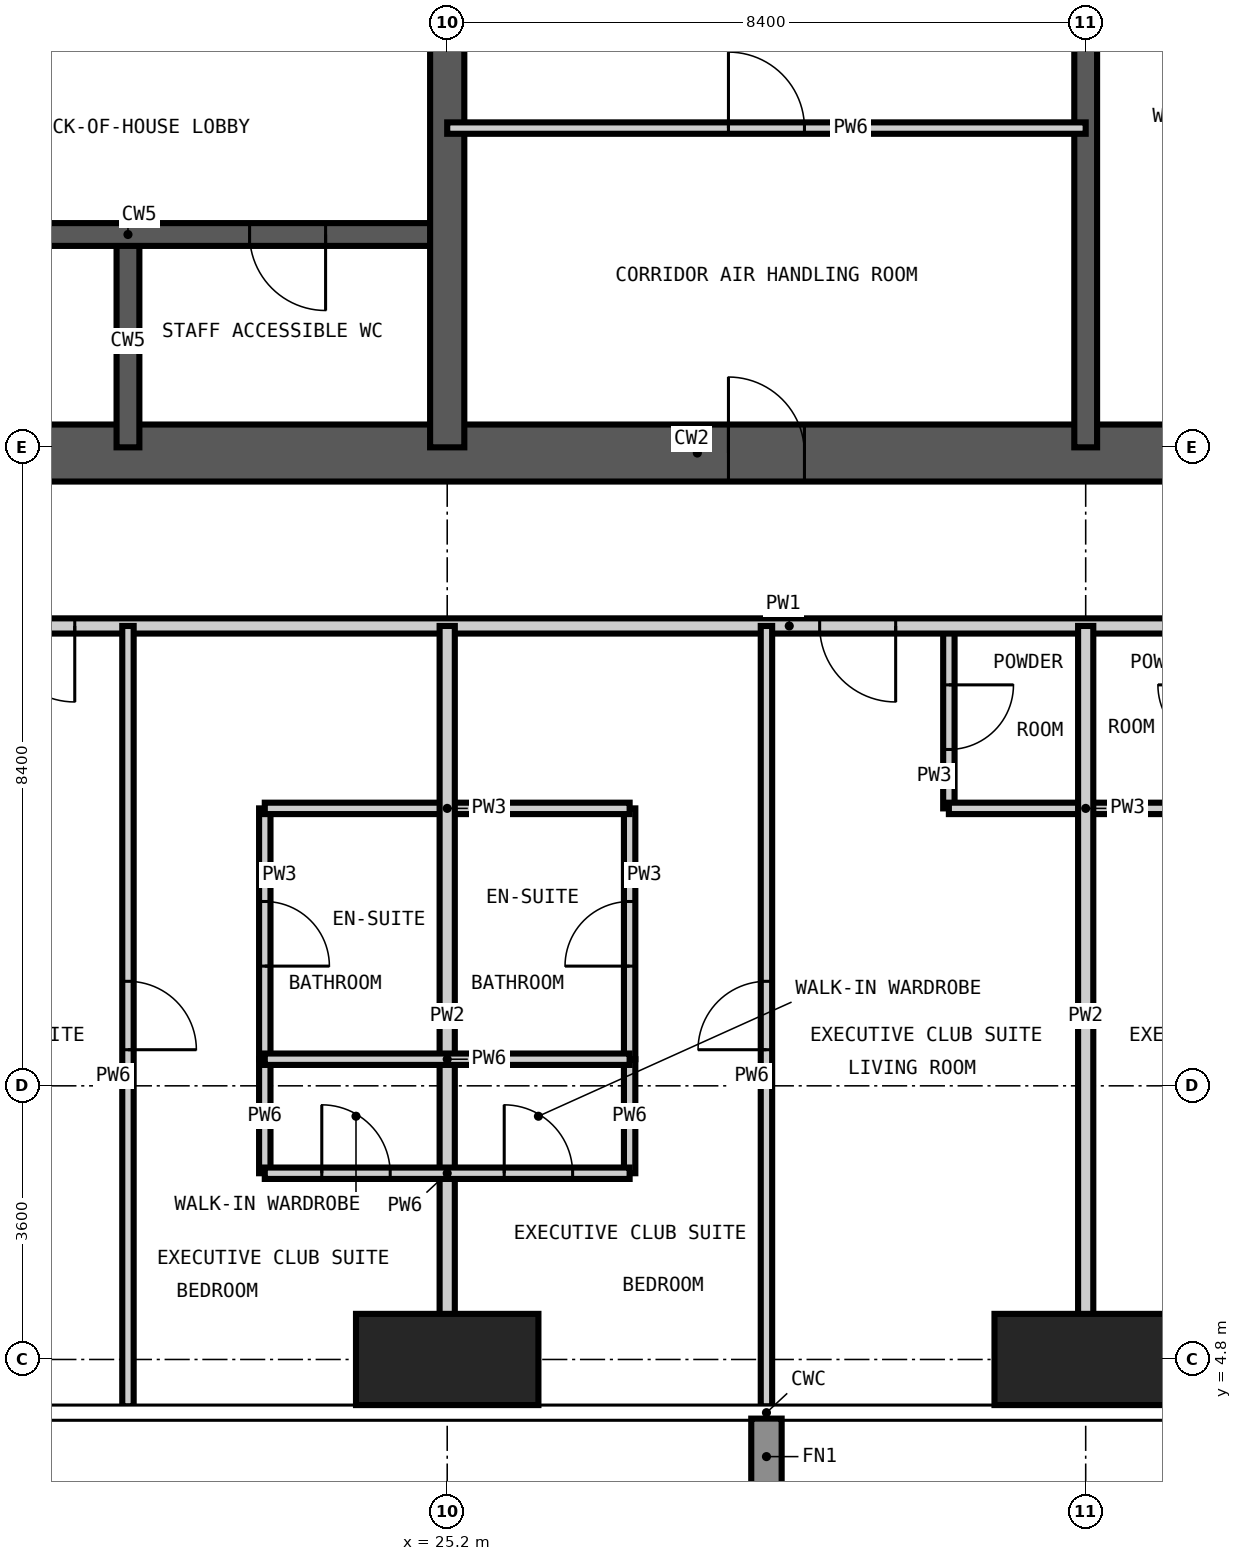
"""IFC4 building model, lengths in metres.
Left out: names, types, materials, properties, quantities, classifications, styles, units other than length and angle.
Written with IfcOpenShell. Run it as: python <this file> out.ifc"""

import sys

from ifc_helpers import new_model, si_unit, direction, frame, frame_2d, origin, origin_2d, place, context, subcontext, project, spatial, rectangle, extrude, element, fill, save


model = new_model("IFC4")
c1 = context("Model", 3, precision=1e-05, world=origin(), true_north=direction((0.0, 1.0)))
c2 = subcontext(c1, "Body", "Model", "MODEL_VIEW")
j1 = project(units=[si_unit("LENGTHUNIT", "METRE"), si_unit("PLANEANGLEUNIT", "RADIAN")], contexts=[c1])
p1 = place(None, origin())
s1 = spatial("IfcSite", under=j1, at=p1, CompositionType="ELEMENT")
p2 = place(p1, origin())
s2 = spatial("IfcBuilding", under=s1, at=p2, CompositionType="ELEMENT")
p3 = place(p2, frame((0.0, 0.0, 177.0)))
s3 = spatial("IfcBuildingStorey", under=s2, at=p3, CompositionType="ELEMENT", Elevation=177.0)
for number, where, z_axis, x_axis in (
    (1, (25.2, 4.8, -0.35), (0.0, 0.0, 1.0), (1.0, 0.0, 0.0)),
    (2, (33.6, 4.8, -0.35), (0.0, 0.0, 1.0), (1.0, 0.0, 0.0)),
):
    element("IfcColumn", number, at=place(p3, frame(where, z_axis=z_axis, x_axis=x_axis)), inside=s3, PredefinedType="COLUMN", context=c2, shape_type="SweptSolid", body=[
        extrude(rectangle(XDim=2.4, YDim=1.2, at=origin_2d()), origin(), (0.0, 0.0, 1.0), 3.6),
    ])
p4 = place(p3, frame((16.35, 16.725, -0.35), z_axis=(0.0, 0.0, 1.0), x_axis=(1.0, 0.0, 0.0)))
e3 = element("IfcWall", 3, at=p4, inside=s3, PredefinedType="SHEAR", context=c2, shape_type="SweptSolid", body=[
    extrude(rectangle(XDim=26.1, YDim=0.75, at=frame_2d((13.05, 0.0))), origin(), (0.0, 0.0, 1.0), 3.6),
])
p5 = place(p4, frame((12.55, 0.0, 0.35)))
e4 = element("IfcOpeningElement", 4, at=p5, cuts=e3, PredefinedType="OPENING", context=c2, shape_type="SweptSolid", body=[
    extrude(rectangle(XDim=1.0, YDim=2.1, at=frame_2d((0.5, 1.05))), frame((0.0, 0.385, 0.0), z_axis=(0.0, -1.0, 0.0), x_axis=(1.0, 0.0, 0.0)), (0.0, 0.0, 1.0), 0.77),
])
p6 = place(p4, frame((18.85, 0.0, 0.35)))
e5 = element("IfcOpeningElement", 5, at=p6, cuts=e3, PredefinedType="OPENING", context=c2, shape_type="SweptSolid", body=[
    extrude(rectangle(XDim=1.0, YDim=2.1, at=frame_2d((0.5, 1.05))), frame((0.0, 0.385, 0.0), z_axis=(0.0, -1.0, 0.0), x_axis=(1.0, 0.0, 0.0)), (0.0, 0.0, 1.0), 0.77),
])
p7 = place(p3, frame((21.0, 16.8, -0.35), z_axis=(0.0, 0.0, 1.0), x_axis=(0.0, 1.0, 0.0)))
e6 = element("IfcWall", 6, at=p7, inside=s3, PredefinedType="SHEAR", context=c2, shape_type="SweptSolid", body=[
    extrude(rectangle(XDim=2.8, YDim=0.3, at=frame_2d((1.4, 0.0))), origin(), (0.0, 0.0, 1.0), 3.6),
])
p8 = place(p3, frame((33.6, 16.8, -0.35), z_axis=(0.0, 0.0, 1.0), x_axis=(0.0, 1.0, 0.0)))
e7 = element("IfcWall", 7, at=p8, inside=s3, PredefinedType="SHEAR", context=c2, shape_type="SweptSolid", body=[
    extrude(rectangle(XDim=25.2, YDim=0.3, at=frame_2d((12.6, 0.0))), origin(), (0.0, 0.0, 1.0), 3.6),
])
p9 = place(p8, frame((22.5, 0.0, 0.35)))
e8 = element("IfcOpeningElement", 8, at=p9, cuts=e7, PredefinedType="OPENING", context=c2, shape_type="SweptSolid", body=[
    extrude(rectangle(XDim=1.2, YDim=2.2, at=frame_2d((0.6, 1.1))), frame((0.0, 0.16, 0.0), z_axis=(0.0, -1.0, 0.0), x_axis=(1.0, 0.0, 0.0)), (0.0, 0.0, 1.0), 0.32),
])
p10 = place(p8, frame((18.3, 0.0, 0.35)))
e9 = element("IfcOpeningElement", 9, at=p10, cuts=e7, PredefinedType="OPENING", context=c2, shape_type="SweptSolid", body=[
    extrude(rectangle(XDim=1.2, YDim=2.2, at=frame_2d((0.6, 1.1))), frame((0.0, 0.16, 0.0), z_axis=(0.0, -1.0, 0.0), x_axis=(1.0, 0.0, 0.0)), (0.0, 0.0, 1.0), 0.32),
])
p11 = place(p8, frame((12.1, 0.0, 0.35)))
e10 = element("IfcOpeningElement", 10, at=p11, cuts=e7, PredefinedType="OPENING", context=c2, shape_type="SweptSolid", body=[
    extrude(rectangle(XDim=1.0, YDim=2.1, at=frame_2d((0.5, 1.05))), frame((0.0, 0.16, 0.0), z_axis=(0.0, -1.0, 0.0), x_axis=(1.0, 0.0, 0.0)), (0.0, 0.0, 1.0), 0.32),
])
p12 = place(p3, frame((16.8, 19.6, -0.35), z_axis=(0.0, 0.0, 1.0), x_axis=(1.0, 0.0, 0.0)))
e11 = element("IfcWall", 11, at=p12, inside=s3, PredefinedType="SHEAR", context=c2, shape_type="SweptSolid", body=[
    extrude(rectangle(XDim=8.4, YDim=0.3, at=frame_2d((4.2, 0.0))), origin(), (0.0, 0.0, 1.0), 3.6),
])
p13 = place(p12, frame((1.6, 0.0, 0.35)))
e12 = element("IfcOpeningElement", 12, at=p13, cuts=e11, PredefinedType="OPENING", context=c2, shape_type="SweptSolid", body=[
    extrude(rectangle(XDim=1.0, YDim=2.1, at=frame_2d((0.5, 1.05))), frame((0.0, 0.16, 0.0), z_axis=(0.0, -1.0, 0.0), x_axis=(1.0, 0.0, 0.0)), (0.0, 0.0, 1.0), 0.32),
])
p14 = place(p12, frame((5.8, 0.0, 0.35)))
e13 = element("IfcOpeningElement", 13, at=p14, cuts=e11, PredefinedType="OPENING", context=c2, shape_type="SweptSolid", body=[
    extrude(rectangle(XDim=1.0, YDim=2.1, at=frame_2d((0.5, 1.05))), frame((0.0, 0.16, 0.0), z_axis=(0.0, -1.0, 0.0), x_axis=(1.0, 0.0, 0.0)), (0.0, 0.0, 1.0), 0.32),
])
p15 = place(p3, frame((25.2, 16.8, -0.35), z_axis=(0.0, 0.0, 1.0), x_axis=(0.0, 1.0, 0.0)))
e14 = element("IfcWall", 14, at=p15, inside=s3, PredefinedType="SHEAR", context=c2, shape_type="SweptSolid", body=[
    extrude(rectangle(XDim=25.2, YDim=0.45, at=frame_2d((12.6, 0.0))), origin(), (0.0, 0.0, 1.0), 3.6),
])
p16 = place(p3, frame((22.8, 8.75, 0.0), z_axis=(0.0, 0.0, 1.0), x_axis=(0.0, 1.0, 0.0)))
e15 = element("IfcWall", 15, at=p16, inside=s3, PredefinedType="PARTITIONING", context=c2, shape_type="SweptSolid", body=[
    extrude(rectangle(XDim=3.3, YDim=0.15, at=frame_2d((1.65, 0.0))), origin(), (0.0, 0.0, 1.0), 3.25),
])
p17 = place(p16, frame((1.225, 0.0, 0.0)))
e16 = element("IfcOpeningElement", 16, at=p17, cuts=e15, PredefinedType="OPENING", context=c2, shape_type="SweptSolid", body=[
    extrude(rectangle(XDim=0.85, YDim=2.1, at=frame_2d((0.425, 1.05))), frame((0.0, 0.085, 0.0), z_axis=(0.0, -1.0, 0.0), x_axis=(1.0, 0.0, 0.0)), (0.0, 0.0, 1.0), 0.17),
])
p18 = place(p3, frame((27.6, 8.75, 0.0), z_axis=(0.0, 0.0, 1.0), x_axis=(0.0, 1.0, 0.0)))
e17 = element("IfcWall", 17, at=p18, inside=s3, PredefinedType="PARTITIONING", context=c2, shape_type="SweptSolid", body=[
    extrude(rectangle(XDim=3.3, YDim=0.15, at=frame_2d((1.65, 0.0))), origin(), (0.0, 0.0, 1.0), 3.25),
])
p19 = place(p18, frame((1.225, 0.0, 0.0)))
e18 = element("IfcOpeningElement", 18, at=p19, cuts=e17, PredefinedType="OPENING", context=c2, shape_type="SweptSolid", body=[
    extrude(rectangle(XDim=0.85, YDim=2.1, at=frame_2d((0.425, 1.05))), frame((0.0, 0.085, 0.0), z_axis=(0.0, -1.0, 0.0), x_axis=(1.0, 0.0, 0.0)), (0.0, 0.0, 1.0), 0.17),
])
p20 = place(p3, frame((31.8, 12.05, 0.0), z_axis=(0.0, 0.0, 1.0), x_axis=(0.0, 1.0, 0.0)))
e19 = element("IfcWall", 19, at=p20, inside=s3, PredefinedType="PARTITIONING", context=c2, shape_type="SweptSolid", body=[
    extrude(rectangle(XDim=2.4, YDim=0.15, at=frame_2d((1.2, 0.0))), origin(), (0.0, 0.0, 1.0), 3.25),
])
p21 = place(p20, frame((0.775, 0.0, 0.0)))
e20 = element("IfcOpeningElement", 20, at=p21, cuts=e19, PredefinedType="OPENING", context=c2, shape_type="SweptSolid", body=[
    extrude(rectangle(XDim=0.85, YDim=2.1, at=frame_2d((0.425, 1.05))), frame((0.0, 0.085, 0.0), z_axis=(0.0, -1.0, 0.0), x_axis=(1.0, 0.0, 0.0)), (0.0, 0.0, 1.0), 0.17),
])
p22 = place(p3, frame((22.8, 12.05, 0.0), z_axis=(0.0, 0.0, 1.0), x_axis=(1.0, 0.0, 0.0)))
e21 = element("IfcWall", 21, at=p22, inside=s3, PredefinedType="PARTITIONING", context=c2, shape_type="SweptSolid", body=[
    extrude(rectangle(XDim=4.8, YDim=0.15, at=frame_2d((2.4, 0.0))), origin(), (0.0, 0.0, 1.0), 3.25),
])
p23 = place(p3, frame((31.8, 12.05, 0.0), z_axis=(0.0, 0.0, 1.0), x_axis=(1.0, 0.0, 0.0)))
e22 = element("IfcWall", 22, at=p23, inside=s3, PredefinedType="PARTITIONING", context=c2, shape_type="SweptSolid", body=[
    extrude(rectangle(XDim=3.6, YDim=0.15, at=frame_2d((1.8, 0.0))), origin(), (0.0, 0.0, 1.0), 3.25),
])
p24 = place(p3, frame((44.95, 14.45, 0.0), z_axis=(0.0, 0.0, 1.0), x_axis=(-1.0, 0.0, 0.0)))
e23 = element("IfcWall", 23, at=p24, inside=s3, PredefinedType="PARTITIONING", context=c2, shape_type="SweptSolid", body=[
    extrude(rectangle(XDim=30.5, YDim=0.2, at=frame_2d((15.25, 0.0))), origin(), (0.0, 0.0, 1.0), 3.25),
])
p25 = place(p24, frame((24.65, 0.0, 0.0)))
e24 = element("IfcOpeningElement", 24, at=p25, cuts=e23, PredefinedType="OPENING", context=c2, shape_type="SweptSolid", body=[
    extrude(rectangle(XDim=1.0, YDim=2.2, at=frame_2d((0.5, 1.1))), frame((0.0, 0.11, 0.0), z_axis=(0.0, -1.0, 0.0), x_axis=(1.0, 0.0, 0.0)), (0.0, 0.0, 1.0), 0.22),
])
p26 = place(p24, frame((13.85, 0.0, 0.0)))
e25 = element("IfcOpeningElement", 25, at=p26, cuts=e23, PredefinedType="OPENING", context=c2, shape_type="SweptSolid", body=[
    extrude(rectangle(XDim=1.0, YDim=2.2, at=frame_2d((0.5, 1.1))), frame((0.0, 0.11, 0.0), z_axis=(0.0, -1.0, 0.0), x_axis=(1.0, 0.0, 0.0)), (0.0, 0.0, 1.0), 0.22),
])
p27 = place(p24, frame((7.85, 0.0, 0.0)))
e26 = element("IfcOpeningElement", 26, at=p27, cuts=e23, PredefinedType="OPENING", context=c2, shape_type="SweptSolid", body=[
    extrude(rectangle(XDim=1.0, YDim=2.2, at=frame_2d((0.5, 1.1))), frame((0.0, 0.11, 0.0), z_axis=(0.0, -1.0, 0.0), x_axis=(1.0, 0.0, 0.0)), (0.0, 0.0, 1.0), 0.22),
])
for number, where, z_axis, x_axis in (
    (27, (25.2, 4.182, 0.0), (0.0, 0.0, 1.0), (0.0, 1.0, 0.0)),
    (28, (33.6, 4.182, 0.0), (0.0, 0.0, 1.0), (0.0, 1.0, 0.0)),
):
    element("IfcWall", number, at=place(p3, frame(where, z_axis=z_axis, x_axis=x_axis)), inside=s3, PredefinedType="PARTITIONING", context=c2, shape_type="SweptSolid", body=[
        extrude(rectangle(XDim=10.268, YDim=0.2, at=frame_2d((5.134, 0.0))), origin(), (0.0, 0.0, 1.0), 3.25),
    ])
p28 = place(p3, frame((21.0, 4.182, 0.0), z_axis=(0.0, 0.0, 1.0), x_axis=(0.0, 1.0, 0.0)))
e29 = element("IfcWall", 29, at=p28, inside=s3, PredefinedType="PARTITIONING", context=c2, shape_type="SweptSolid", body=[
    extrude(rectangle(XDim=10.268, YDim=0.15, at=frame_2d((5.134, 0.0))), origin(), (0.0, 0.0, 1.0), 3.25),
])
p29 = place(p28, frame((4.693, 0.0, 0.0)))
e30 = element("IfcOpeningElement", 30, at=p29, cuts=e29, PredefinedType="OPENING", context=c2, shape_type="SweptSolid", body=[
    extrude(rectangle(XDim=0.9, YDim=2.1, at=frame_2d((0.45, 1.05))), frame((0.0, 0.085, 0.0), z_axis=(0.0, -1.0, 0.0), x_axis=(1.0, 0.0, 0.0)), (0.0, 0.0, 1.0), 0.17),
])
for number, where, z_axis, x_axis in (
    (31, (22.8, 7.25, 0.0), (0.0, 0.0, 1.0), (0.0, 1.0, 0.0)),
    (32, (27.6, 7.25, 0.0), (0.0, 0.0, 1.0), (0.0, 1.0, 0.0)),
):
    element("IfcWall", number, at=place(p3, frame(where, z_axis=z_axis, x_axis=x_axis)), inside=s3, PredefinedType="PARTITIONING", context=c2, shape_type="SweptSolid", body=[
        extrude(rectangle(XDim=1.5, YDim=0.15, at=frame_2d((0.75, 0.0))), origin(), (0.0, 0.0, 1.0), 3.25),
    ])
p30 = place(p3, frame((29.4, 4.182, 0.0), z_axis=(0.0, 0.0, 1.0), x_axis=(0.0, 1.0, 0.0)))
e33 = element("IfcWall", 33, at=p30, inside=s3, PredefinedType="PARTITIONING", context=c2, shape_type="SweptSolid", body=[
    extrude(rectangle(XDim=10.268, YDim=0.15, at=frame_2d((5.134, 0.0))), origin(), (0.0, 0.0, 1.0), 3.25),
])
p31 = place(p30, frame((4.693, 0.0, 0.0)))
e34 = element("IfcOpeningElement", 34, at=p31, cuts=e33, PredefinedType="OPENING", context=c2, shape_type="SweptSolid", body=[
    extrude(rectangle(XDim=0.9, YDim=2.1, at=frame_2d((0.45, 1.05))), frame((0.0, 0.085, 0.0), z_axis=(0.0, -1.0, 0.0), x_axis=(1.0, 0.0, 0.0)), (0.0, 0.0, 1.0), 0.17),
])
p32 = place(p3, frame((22.8, 7.25, 0.0), z_axis=(0.0, 0.0, 1.0), x_axis=(1.0, 0.0, 0.0)))
e35 = element("IfcWall", 35, at=p32, inside=s3, PredefinedType="PARTITIONING", context=c2, shape_type="SweptSolid", body=[
    extrude(rectangle(XDim=4.8, YDim=0.15, at=frame_2d((2.4, 0.0))), origin(), (0.0, 0.0, 1.0), 3.25),
])
p33 = place(p32, frame((0.75, 0.0, 0.0)))
e36 = element("IfcOpeningElement", 36, at=p33, cuts=e35, PredefinedType="OPENING", context=c2, shape_type="SweptSolid", body=[
    extrude(rectangle(XDim=0.9, YDim=2.1, at=frame_2d((0.45, 1.05))), frame((0.0, 0.085, 0.0), z_axis=(0.0, -1.0, 0.0), x_axis=(1.0, 0.0, 0.0)), (0.0, 0.0, 1.0), 0.17),
])
p34 = place(p32, frame((3.15, 0.0, 0.0)))
e37 = element("IfcOpeningElement", 37, at=p34, cuts=e35, PredefinedType="OPENING", context=c2, shape_type="SweptSolid", body=[
    extrude(rectangle(XDim=0.9, YDim=2.1, at=frame_2d((0.45, 1.05))), frame((0.0, 0.085, 0.0), z_axis=(0.0, -1.0, 0.0), x_axis=(1.0, 0.0, 0.0)), (0.0, 0.0, 1.0), 0.17),
])
p35 = place(p3, frame((22.8, 8.75, 0.0), z_axis=(0.0, 0.0, 1.0), x_axis=(1.0, 0.0, 0.0)))
e38 = element("IfcWall", 38, at=p35, inside=s3, PredefinedType="PARTITIONING", context=c2, shape_type="SweptSolid", body=[
    extrude(rectangle(XDim=4.8, YDim=0.15, at=frame_2d((2.4, 0.0))), origin(), (0.0, 0.0, 1.0), 3.25),
])
p36 = place(p3, frame((25.2, 21.0, 0.0), z_axis=(0.0, 0.0, 1.0), x_axis=(1.0, 0.0, 0.0)))
e39 = element("IfcWall", 39, at=p36, inside=s3, PredefinedType="PARTITIONING", context=c2, shape_type="SweptSolid", body=[
    extrude(rectangle(XDim=8.4, YDim=0.15, at=frame_2d((4.2, 0.0))), origin(), (0.0, 0.0, 1.0), 3.25),
])
p37 = place(p36, frame((3.7, 0.0, 0.0)))
e40 = element("IfcOpeningElement", 40, at=p37, cuts=e39, PredefinedType="OPENING", context=c2, shape_type="SweptSolid", body=[
    extrude(rectangle(XDim=1.0, YDim=2.1, at=frame_2d((0.5, 1.05))), frame((0.0, 0.085, 0.0), z_axis=(0.0, -1.0, 0.0), x_axis=(1.0, 0.0, 0.0)), (0.0, 0.0, 1.0), 0.17),
])
p38 = place(p25, origin())
e41 = element("IfcDoor", 41, at=p38, inside=s3, OperationType="SINGLE_SWING_LEFT", PredefinedType="DOOR", context=c2, shape_type="SweptSolid", body=[
    extrude(rectangle(XDim=1.0, YDim=2.2, at=frame_2d((0.5, 1.1))), frame((0.0, 0.025, 0.0), z_axis=(0.0, -1.0, 0.0), x_axis=(1.0, 0.0, 0.0)), (0.0, 0.0, 1.0), 0.05),
])
fill(e24, e41)
p39 = place(p29, frame((0.9, 0.0, 0.0), z_axis=(0.0, 0.0, 1.0), x_axis=(-1.0, 0.0, 0.0)))
e42 = element("IfcDoor", 42, at=p39, inside=s3, OperationType="SINGLE_SWING_RIGHT", PredefinedType="DOOR", context=c2, shape_type="SweptSolid", body=[
    extrude(rectangle(XDim=0.9, YDim=2.1, at=frame_2d((0.45, 1.05))), frame((0.0, 0.025, 0.0), z_axis=(0.0, -1.0, 0.0), x_axis=(1.0, 0.0, 0.0)), (0.0, 0.0, 1.0), 0.05),
])
fill(e30, e42)
p40 = place(p17, frame((0.85, 0.0, 0.0), z_axis=(0.0, 0.0, 1.0), x_axis=(-1.0, 0.0, 0.0)))
e43 = element("IfcDoor", 43, at=p40, inside=s3, OperationType="SINGLE_SWING_RIGHT", PredefinedType="DOOR", context=c2, shape_type="SweptSolid", body=[
    extrude(rectangle(XDim=0.85, YDim=2.1, at=frame_2d((0.425, 1.05))), frame((0.0, 0.025, 0.0), z_axis=(0.0, -1.0, 0.0), x_axis=(1.0, 0.0, 0.0)), (0.0, 0.0, 1.0), 0.05),
])
fill(e16, e43)
p41 = place(p33, origin())
e44 = element("IfcDoor", 44, at=p41, inside=s3, OperationType="SINGLE_SWING_LEFT", PredefinedType="DOOR", context=c2, shape_type="SweptSolid", body=[
    extrude(rectangle(XDim=0.9, YDim=2.1, at=frame_2d((0.45, 1.05))), frame((0.0, 0.025, 0.0), z_axis=(0.0, -1.0, 0.0), x_axis=(1.0, 0.0, 0.0)), (0.0, 0.0, 1.0), 0.05),
])
fill(e36, e44)
p42 = place(p26, origin())
e45 = element("IfcDoor", 45, at=p42, inside=s3, OperationType="SINGLE_SWING_LEFT", PredefinedType="DOOR", context=c2, shape_type="SweptSolid", body=[
    extrude(rectangle(XDim=1.0, YDim=2.2, at=frame_2d((0.5, 1.1))), frame((0.0, 0.025, 0.0), z_axis=(0.0, -1.0, 0.0), x_axis=(1.0, 0.0, 0.0)), (0.0, 0.0, 1.0), 0.05),
])
fill(e25, e45)
p43 = place(p21, frame((0.85, 0.0, 0.0), z_axis=(0.0, 0.0, 1.0), x_axis=(-1.0, 0.0, 0.0)))
e46 = element("IfcDoor", 46, at=p43, inside=s3, OperationType="SINGLE_SWING_LEFT", PredefinedType="DOOR", context=c2, shape_type="SweptSolid", body=[
    extrude(rectangle(XDim=0.85, YDim=2.1, at=frame_2d((0.425, 1.05))), frame((0.0, 0.025, 0.0), z_axis=(0.0, -1.0, 0.0), x_axis=(1.0, 0.0, 0.0)), (0.0, 0.0, 1.0), 0.05),
])
fill(e20, e46)
p44 = place(p31, origin())
e47 = element("IfcDoor", 47, at=p44, inside=s3, OperationType="SINGLE_SWING_LEFT", PredefinedType="DOOR", context=c2, shape_type="SweptSolid", body=[
    extrude(rectangle(XDim=0.9, YDim=2.1, at=frame_2d((0.45, 1.05))), frame((0.0, 0.025, 0.0), z_axis=(0.0, -1.0, 0.0), x_axis=(1.0, 0.0, 0.0)), (0.0, 0.0, 1.0), 0.05),
])
fill(e34, e47)
p45 = place(p19, origin())
e48 = element("IfcDoor", 48, at=p45, inside=s3, OperationType="SINGLE_SWING_LEFT", PredefinedType="DOOR", context=c2, shape_type="SweptSolid", body=[
    extrude(rectangle(XDim=0.85, YDim=2.1, at=frame_2d((0.425, 1.05))), frame((0.0, 0.025, 0.0), z_axis=(0.0, -1.0, 0.0), x_axis=(1.0, 0.0, 0.0)), (0.0, 0.0, 1.0), 0.05),
])
fill(e18, e48)
p46 = place(p34, origin())
e49 = element("IfcDoor", 49, at=p46, inside=s3, OperationType="SINGLE_SWING_LEFT", PredefinedType="DOOR", context=c2, shape_type="SweptSolid", body=[
    extrude(rectangle(XDim=0.9, YDim=2.1, at=frame_2d((0.45, 1.05))), frame((0.0, 0.025, 0.0), z_axis=(0.0, -1.0, 0.0), x_axis=(1.0, 0.0, 0.0)), (0.0, 0.0, 1.0), 0.05),
])
fill(e37, e49)
p47 = place(p14, frame((1.0, 0.0, 0.0), z_axis=(0.0, 0.0, 1.0), x_axis=(-1.0, 0.0, 0.0)))
e50 = element("IfcDoor", 50, at=p47, inside=s3, OperationType="SINGLE_SWING_LEFT", PredefinedType="DOOR", context=c2, shape_type="SweptSolid", body=[
    extrude(rectangle(XDim=1.0, YDim=2.1, at=frame_2d((0.5, 1.05))), frame((0.0, 0.025, 0.0), z_axis=(0.0, -1.0, 0.0), x_axis=(1.0, 0.0, 0.0)), (0.0, 0.0, 1.0), 0.05),
])
fill(e13, e50)
p48 = place(p5, origin())
e51 = element("IfcDoor", 51, at=p48, inside=s3, OperationType="SINGLE_SWING_LEFT", PredefinedType="DOOR", context=c2, shape_type="SweptSolid", body=[
    extrude(rectangle(XDim=1.0, YDim=2.1, at=frame_2d((0.5, 1.05))), frame((0.0, 0.025, 0.0), z_axis=(0.0, -1.0, 0.0), x_axis=(1.0, 0.0, 0.0)), (0.0, 0.0, 1.0), 0.05),
])
fill(e4, e51)
p49 = place(p37, origin())
e52 = element("IfcDoor", 52, at=p49, inside=s3, OperationType="SINGLE_SWING_LEFT", PredefinedType="DOOR", context=c2, shape_type="SweptSolid", body=[
    extrude(rectangle(XDim=1.0, YDim=2.1, at=frame_2d((0.5, 1.05))), frame((0.0, 0.025, 0.0), z_axis=(0.0, -1.0, 0.0), x_axis=(1.0, 0.0, 0.0)), (0.0, 0.0, 1.0), 0.05),
])
fill(e40, e52)
save(model, sys.argv[1])
